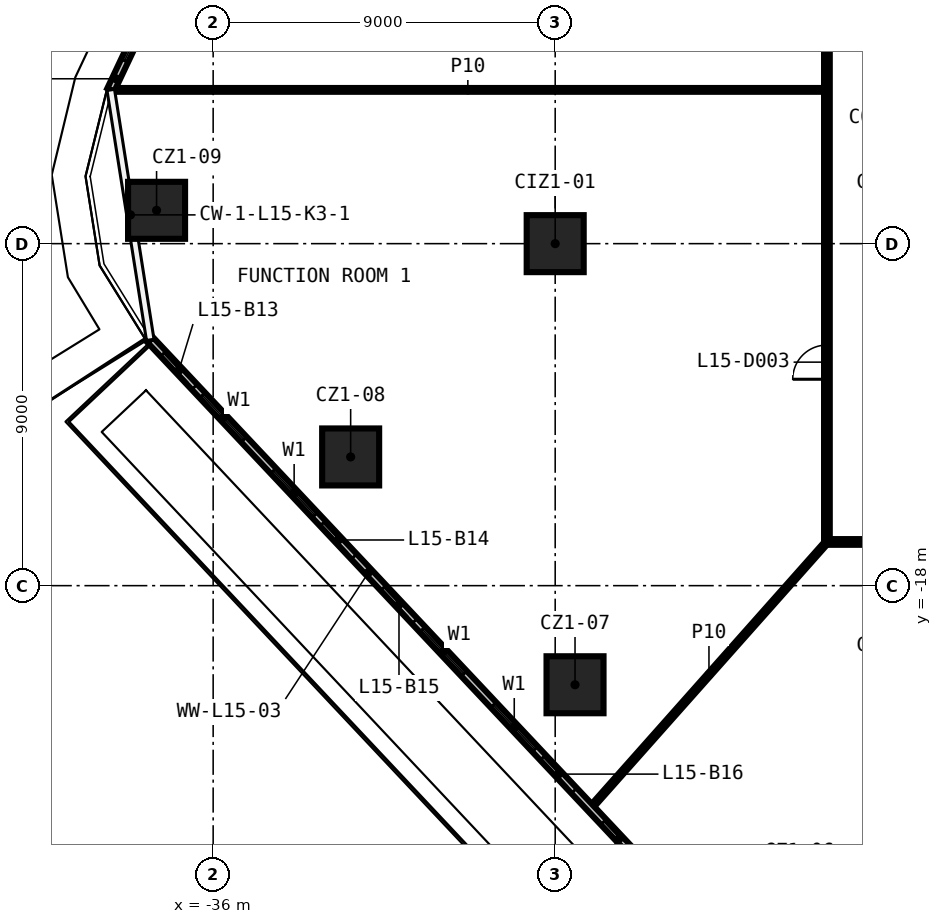
"""IFC4 building model, lengths in metres.
Left out: names, types, materials, properties, quantities, classifications, styles, units other than length and angle.
Written with IfcOpenShell. Run it as: python <this file> out.ifc"""

import sys

from ifc_helpers import new_model, si_unit, direction, frame, frame_2d, origin, origin_2d, place, context, subcontext, project, spatial, rectangle, extrude, element, fill, save


model = new_model("IFC4")
c1 = context("Model", 3, precision=1e-05, world=origin(), true_north=direction((0.0, 1.0)))
c2 = subcontext(c1, "Body", "Model", "MODEL_VIEW")
j1 = project(units=[si_unit("LENGTHUNIT", "METRE"), si_unit("PLANEANGLEUNIT", "RADIAN")], contexts=[c1])
p1 = place(None, origin())
s1 = spatial("IfcSite", under=j1, at=p1, CompositionType="ELEMENT")
p2 = place(p1, origin())
s2 = spatial("IfcBuilding", under=s1, at=p2, CompositionType="ELEMENT")
p3 = place(p2, frame((0.0, 0.0, 77.3)))
s3 = spatial("IfcBuildingStorey", under=s2, at=p3, CompositionType="ELEMENT", Elevation=77.3)
for number, where, z_axis, x_axis in (
    (1, (-26.478, -20.608, 0.0), (0.0, 0.0, 1.0), (1.0, 0.0, 0.0)),
    (2, (-32.382, -14.613, 0.0), (0.0, 0.0, 1.0), (1.0, 0.0, 0.0)),
    (3, (-37.489, -8.123, 0.0), (0.0, 0.0, 1.0), (1.0, 0.0, 0.0)),
    (4, (-27.0, -9.0, 0.0), (0.0, 0.0, 1.0), (1.0, 0.0, 0.0)),
):
    element("IfcColumn", number, at=place(p3, frame(where, z_axis=z_axis, x_axis=x_axis)), inside=s3, PredefinedType="COLUMN", context=c2, shape_type="SweptSolid", body=[
        extrude(rectangle(XDim=1.5, YDim=1.5, at=origin_2d()), origin(), (0.0, 0.0, 1.0), 3.3),
    ])
p4 = place(p3, frame((19.925, -16.85, 0.0), z_axis=(0.0, 0.0, 1.0), x_axis=(-1.0, 0.0, 0.0)))
e5 = element("IfcWall", 5, at=p4, inside=s3, PredefinedType="PARTITIONING", context=c2, shape_type="SweptSolid", body=[
    extrude(rectangle(XDim=39.85, YDim=0.15, at=frame_2d((19.925, 0.0))), origin(), (0.0, 0.0, 1.0), 3.3),
])
p5 = place(p4, frame((35.06, 0.0, 0.0)))
e6 = element("IfcOpeningElement", 6, at=p5, cuts=e5, PredefinedType="OPENING", context=c2, shape_type="SweptSolid", body=[
    extrude(rectangle(XDim=0.9, YDim=2.1, at=frame_2d((0.45, 1.05))), frame((0.0, 0.085, 0.0), z_axis=(0.0, -1.0, 0.0), x_axis=(1.0, 0.0, 0.0)), (0.0, 0.0, 1.0), 0.17),
])
p6 = place(p4, frame((30.967, 0.0, 0.0)))
e7 = element("IfcOpeningElement", 7, at=p6, cuts=e5, PredefinedType="OPENING", context=c2, shape_type="SweptSolid", body=[
    extrude(rectangle(XDim=1.0, YDim=2.1, at=frame_2d((0.5, 1.05))), frame((0.0, 0.085, 0.0), z_axis=(0.0, -1.0, 0.0), x_axis=(1.0, 0.0, 0.0)), (0.0, 0.0, 1.0), 0.17),
])
p7 = place(p4, frame((21.934, 0.0, 0.0)))
e8 = element("IfcOpeningElement", 8, at=p7, cuts=e5, PredefinedType="OPENING", context=c2, shape_type="SweptSolid", body=[
    extrude(rectangle(XDim=0.9, YDim=2.1, at=frame_2d((0.45, 1.05))), frame((0.0, 0.085, 0.0), z_axis=(0.0, -1.0, 0.0), x_axis=(1.0, 0.0, 0.0)), (0.0, 0.0, 1.0), 0.17),
])
p8 = place(p4, frame((3.879, 0.0, 0.0)))
e9 = element("IfcOpeningElement", 9, at=p8, cuts=e5, PredefinedType="OPENING", context=c2, shape_type="SweptSolid", body=[
    extrude(rectangle(XDim=0.9, YDim=2.1, at=frame_2d((0.45, 1.05))), frame((0.0, 0.085, 0.0), z_axis=(0.0, -1.0, 0.0), x_axis=(1.0, 0.0, 0.0)), (0.0, 0.0, 1.0), 0.17),
])
p9 = place(p3, frame((-38.672, -4.954, 0.0), z_axis=(0.0, 0.0, 1.0), x_axis=(1.0, 0.0, 0.0)))
e10 = element("IfcWall", 10, at=p9, inside=s3, PredefinedType="PARTITIONING", context=c2, shape_type="SweptSolid", body=[
    extrude(rectangle(XDim=18.747, YDim=0.1, at=frame_2d((9.374, 0.0))), origin(), (0.0, 0.0, 1.0), 3.3),
])
p10 = place(p3, frame((-26.058, -23.84, 0.0), z_axis=(0.0, 0.0, 1.0), x_axis=(0.664057412605, 0.747681585145, 0.0)))
e11 = element("IfcWall", 11, at=p10, inside=s3, PredefinedType="PARTITIONING", context=c2, shape_type="SweptSolid", body=[
    extrude(rectangle(XDim=9.348, YDim=0.1, at=frame_2d((4.674, 0.0))), origin(), (0.0, 0.0, 1.0), 3.3),
])
p11 = place(p3, frame((-19.85, -16.775, 0.0), z_axis=(0.0, 0.0, 1.0), x_axis=(0.0, 1.0, 0.0)))
e12 = element("IfcWall", 12, at=p11, inside=s3, PredefinedType="PARTITIONING", context=c2, shape_type="SweptSolid", body=[
    extrude(rectangle(XDim=33.55, YDim=0.15, at=frame_2d((16.775, 0.0))), origin(), (0.0, 0.0, 1.0), 3.3),
])
p12 = place(p11, frame((13.332, 0.0, 0.0)))
e13 = element("IfcOpeningElement", 13, at=p12, cuts=e12, PredefinedType="OPENING", context=c2, shape_type="SweptSolid", body=[
    extrude(rectangle(XDim=1.0, YDim=2.1, at=frame_2d((0.5, 1.05))), frame((0.0, 0.085, 0.0), z_axis=(0.0, -1.0, 0.0), x_axis=(1.0, 0.0, 0.0)), (0.0, 0.0, 1.0), 0.17),
])
p13 = place(p11, frame((4.207, 0.0, 0.0)))
e14 = element("IfcOpeningElement", 14, at=p13, cuts=e12, PredefinedType="OPENING", context=c2, shape_type="SweptSolid", body=[
    extrude(rectangle(XDim=0.9, YDim=2.1, at=frame_2d((0.45, 1.05))), frame((0.0, 0.085, 0.0), z_axis=(0.0, -1.0, 0.0), x_axis=(1.0, 0.0, 0.0)), (0.0, 0.0, 1.0), 0.17),
])
p14 = place(p11, frame((21.389, 0.0, 0.0)))
e15 = element("IfcOpeningElement", 15, at=p14, cuts=e12, PredefinedType="OPENING", context=c2, shape_type="SweptSolid", body=[
    extrude(rectangle(XDim=1.0, YDim=2.1, at=frame_2d((0.5, 1.05))), frame((0.0, 0.085, 0.0), z_axis=(0.0, -1.0, 0.0), x_axis=(1.0, 0.0, 0.0)), (0.0, 0.0, 1.0), 0.17),
])
p15 = place(p3, frame((-36.794, -0.933, 0.0), z_axis=(0.0, 0.0, 1.0), x_axis=(-0.427189555154, -0.904162089433, 0.0)))
e16 = element("IfcWall", 16, at=p15, inside=s3, PredefinedType="SOLIDWALL", context=c2, shape_type="SweptSolid", body=[
    extrude(rectangle(XDim=4.448, YDim=0.2, at=frame_2d((2.224, 0.0))), origin(), (0.0, 0.0, 1.0), 3.3),
])
p16 = place(p15, frame((2.0, 0.0, 0.6)))
e17 = element("IfcOpeningElement", 17, at=p16, cuts=e16, PredefinedType="OPENING", context=c2, shape_type="SweptSolid", body=[
    extrude(rectangle(XDim=1.6, YDim=2.4, at=frame_2d((0.8, 1.2))), frame((0.0, 0.11, 0.0), z_axis=(0.0, -1.0, 0.0), x_axis=(1.0, 0.0, 0.0)), (0.0, 0.0, 1.0), 0.22),
])
p17 = place(p15, frame((0.5, 0.0, 0.0)))
e18 = element("IfcOpeningElement", 18, at=p17, cuts=e16, PredefinedType="OPENING", context=c2, shape_type="SweptSolid", body=[
    extrude(rectangle(XDim=1.2, YDim=2.4, at=frame_2d((0.6, 1.2))), frame((0.0, 0.11, 0.0), z_axis=(0.0, -1.0, 0.0), x_axis=(1.0, 0.0, 0.0)), (0.0, 0.0, 1.0), 0.22),
])
p18 = place(p3, frame((-37.656, -11.532, 0.0), z_axis=(0.0, 0.0, 1.0), x_axis=(0.684960405986, -0.728580292234, 0.0)))
e19 = element("IfcWall", 19, at=p18, inside=s3, PredefinedType="SOLIDWALL", context=c2, shape_type="SweptSolid", body=[
    extrude(rectangle(XDim=21.14, YDim=0.2, at=frame_2d((10.57, 0.0))), origin(), (0.0, 0.0, 1.0), 3.3),
])
p19 = place(p18, frame((2.0, 0.0, 0.6)))
e20 = element("IfcOpeningElement", 20, at=p19, cuts=e19, PredefinedType="OPENING", context=c2, shape_type="SweptSolid", body=[
    extrude(rectangle(XDim=1.6, YDim=2.4, at=frame_2d((0.8, 1.2))), frame((0.0, 0.11, 0.0), z_axis=(0.0, -1.0, 0.0), x_axis=(1.0, 0.0, 0.0)), (0.0, 0.0, 1.0), 0.22),
])
p20 = place(p18, frame((0.5, 0.0, 0.0)))
e21 = element("IfcOpeningElement", 21, at=p20, cuts=e19, PredefinedType="OPENING", context=c2, shape_type="SweptSolid", body=[
    extrude(rectangle(XDim=1.2, YDim=2.4, at=frame_2d((0.6, 1.2))), frame((0.0, 0.11, 0.0), z_axis=(0.0, -1.0, 0.0), x_axis=(1.0, 0.0, 0.0)), (0.0, 0.0, 1.0), 0.22),
])
p21 = place(p18, frame((4.728, 0.0, 0.6)))
e22 = element("IfcOpeningElement", 22, at=p21, cuts=e19, PredefinedType="OPENING", context=c2, shape_type="SweptSolid", body=[
    extrude(rectangle(XDim=1.6, YDim=2.4, at=frame_2d((0.8, 1.2))), frame((0.0, 0.11, 0.0), z_axis=(0.0, -1.0, 0.0), x_axis=(1.0, 0.0, 0.0)), (0.0, 0.0, 1.0), 0.22),
])
p22 = place(p18, frame((6.628, 0.0, 0.0)))
e23 = element("IfcOpeningElement", 23, at=p22, cuts=e19, PredefinedType="OPENING", context=c2, shape_type="SweptSolid", body=[
    extrude(rectangle(XDim=1.2, YDim=2.4, at=frame_2d((0.6, 1.2))), frame((0.0, 0.11, 0.0), z_axis=(0.0, -1.0, 0.0), x_axis=(1.0, 0.0, 0.0)), (0.0, 0.0, 1.0), 0.22),
])
p23 = place(p18, frame((10.456, 0.0, 0.6)))
e24 = element("IfcOpeningElement", 24, at=p23, cuts=e19, PredefinedType="OPENING", context=c2, shape_type="SweptSolid", body=[
    extrude(rectangle(XDim=1.6, YDim=2.4, at=frame_2d((0.8, 1.2))), frame((0.0, 0.11, 0.0), z_axis=(0.0, -1.0, 0.0), x_axis=(1.0, 0.0, 0.0)), (0.0, 0.0, 1.0), 0.22),
])
p24 = place(p18, frame((8.956, 0.0, 0.0)))
e25 = element("IfcOpeningElement", 25, at=p24, cuts=e19, PredefinedType="OPENING", context=c2, shape_type="SweptSolid", body=[
    extrude(rectangle(XDim=1.2, YDim=2.4, at=frame_2d((0.6, 1.2))), frame((0.0, 0.11, 0.0), z_axis=(0.0, -1.0, 0.0), x_axis=(1.0, 0.0, 0.0)), (0.0, 0.0, 1.0), 0.22),
])
p25 = place(p18, frame((13.184, 0.0, 0.6)))
e26 = element("IfcOpeningElement", 26, at=p25, cuts=e19, PredefinedType="OPENING", context=c2, shape_type="SweptSolid", body=[
    extrude(rectangle(XDim=1.6, YDim=2.4, at=frame_2d((0.8, 1.2))), frame((0.0, 0.11, 0.0), z_axis=(0.0, -1.0, 0.0), x_axis=(1.0, 0.0, 0.0)), (0.0, 0.0, 1.0), 0.22),
])
p26 = place(p18, frame((15.084, 0.0, 0.0)))
e27 = element("IfcOpeningElement", 27, at=p26, cuts=e19, PredefinedType="OPENING", context=c2, shape_type="SweptSolid", body=[
    extrude(rectangle(XDim=1.2, YDim=2.4, at=frame_2d((0.6, 1.2))), frame((0.0, 0.11, 0.0), z_axis=(0.0, -1.0, 0.0), x_axis=(1.0, 0.0, 0.0)), (0.0, 0.0, 1.0), 0.22),
])
p27 = place(p18, frame((18.912, 0.0, 0.6)))
e28 = element("IfcOpeningElement", 28, at=p27, cuts=e19, PredefinedType="OPENING", context=c2, shape_type="SweptSolid", body=[
    extrude(rectangle(XDim=1.6, YDim=2.4, at=frame_2d((0.8, 1.2))), frame((0.0, 0.11, 0.0), z_axis=(0.0, -1.0, 0.0), x_axis=(1.0, 0.0, 0.0)), (0.0, 0.0, 1.0), 0.22),
])
p28 = place(p18, frame((17.412, 0.0, 0.0)))
e29 = element("IfcOpeningElement", 29, at=p28, cuts=e19, PredefinedType="OPENING", context=c2, shape_type="SweptSolid", body=[
    extrude(rectangle(XDim=1.2, YDim=2.4, at=frame_2d((0.6, 1.2))), frame((0.0, 0.11, 0.0), z_axis=(0.0, -1.0, 0.0), x_axis=(1.0, 0.0, 0.0)), (0.0, 0.0, 1.0), 0.22),
])
p29 = place(p13, origin())
e30 = element("IfcDoor", 30, at=p29, inside=s3, OperationType="SINGLE_SWING_LEFT", PredefinedType="DOOR", context=c2, shape_type="SweptSolid", body=[
    extrude(rectangle(XDim=0.9, YDim=2.1, at=frame_2d((0.45, 1.05))), frame((0.0, 0.025, 0.0), z_axis=(0.0, -1.0, 0.0), x_axis=(1.0, 0.0, 0.0)), (0.0, 0.0, 1.0), 0.05),
])
fill(e14, e30)
p30 = place(p16, origin())
e31 = element("IfcWindow", 31, at=p30, inside=s3, PartitioningType="SINGLE_PANEL", PredefinedType="WINDOW", context=c2, shape_type="SweptSolid", body=[
    extrude(rectangle(XDim=1.6, YDim=2.4, at=frame_2d((0.8, 1.2))), frame((0.0, 0.03, 0.0), z_axis=(0.0, -1.0, 0.0), x_axis=(1.0, 0.0, 0.0)), (0.0, 0.0, 1.0), 0.06),
])
fill(e17, e31)
p31 = place(p19, origin())
e32 = element("IfcWindow", 32, at=p31, inside=s3, PartitioningType="SINGLE_PANEL", PredefinedType="WINDOW", context=c2, shape_type="SweptSolid", body=[
    extrude(rectangle(XDim=1.6, YDim=2.4, at=frame_2d((0.8, 1.2))), frame((0.0, 0.03, 0.0), z_axis=(0.0, -1.0, 0.0), x_axis=(1.0, 0.0, 0.0)), (0.0, 0.0, 1.0), 0.06),
])
fill(e20, e32)
p32 = place(p20, origin())
e33 = element("IfcDoor", 33, at=p32, inside=s3, OperationType="SLIDING_TO_LEFT", PredefinedType="DOOR", context=c2, shape_type="SweptSolid", body=[
    extrude(rectangle(XDim=1.2, YDim=2.4, at=frame_2d((0.6, 1.2))), frame((0.0, 0.025, 0.0), z_axis=(0.0, -1.0, 0.0), x_axis=(1.0, 0.0, 0.0)), (0.0, 0.0, 1.0), 0.05),
])
fill(e21, e33)
p33 = place(p21, origin())
e34 = element("IfcWindow", 34, at=p33, inside=s3, PartitioningType="SINGLE_PANEL", PredefinedType="WINDOW", context=c2, shape_type="SweptSolid", body=[
    extrude(rectangle(XDim=1.6, YDim=2.4, at=frame_2d((0.8, 1.2))), frame((0.0, 0.03, 0.0), z_axis=(0.0, -1.0, 0.0), x_axis=(1.0, 0.0, 0.0)), (0.0, 0.0, 1.0), 0.06),
])
fill(e22, e34)
p34 = place(p22, origin())
e35 = element("IfcDoor", 35, at=p34, inside=s3, OperationType="SLIDING_TO_LEFT", PredefinedType="DOOR", context=c2, shape_type="SweptSolid", body=[
    extrude(rectangle(XDim=1.2, YDim=2.4, at=frame_2d((0.6, 1.2))), frame((0.0, 0.025, 0.0), z_axis=(0.0, -1.0, 0.0), x_axis=(1.0, 0.0, 0.0)), (0.0, 0.0, 1.0), 0.05),
])
fill(e23, e35)
p35 = place(p23, origin())
e36 = element("IfcWindow", 36, at=p35, inside=s3, PartitioningType="SINGLE_PANEL", PredefinedType="WINDOW", context=c2, shape_type="SweptSolid", body=[
    extrude(rectangle(XDim=1.6, YDim=2.4, at=frame_2d((0.8, 1.2))), frame((0.0, 0.03, 0.0), z_axis=(0.0, -1.0, 0.0), x_axis=(1.0, 0.0, 0.0)), (0.0, 0.0, 1.0), 0.06),
])
fill(e24, e36)
p36 = place(p24, origin())
e37 = element("IfcDoor", 37, at=p36, inside=s3, OperationType="SLIDING_TO_LEFT", PredefinedType="DOOR", context=c2, shape_type="SweptSolid", body=[
    extrude(rectangle(XDim=1.2, YDim=2.4, at=frame_2d((0.6, 1.2))), frame((0.0, 0.025, 0.0), z_axis=(0.0, -1.0, 0.0), x_axis=(1.0, 0.0, 0.0)), (0.0, 0.0, 1.0), 0.05),
])
fill(e25, e37)
p37 = place(p25, origin())
e38 = element("IfcWindow", 38, at=p37, inside=s3, PartitioningType="SINGLE_PANEL", PredefinedType="WINDOW", context=c2, shape_type="SweptSolid", body=[
    extrude(rectangle(XDim=1.6, YDim=2.4, at=frame_2d((0.8, 1.2))), frame((0.0, 0.03, 0.0), z_axis=(0.0, -1.0, 0.0), x_axis=(1.0, 0.0, 0.0)), (0.0, 0.0, 1.0), 0.06),
])
fill(e26, e38)
p38 = place(p26, origin())
e39 = element("IfcDoor", 39, at=p38, inside=s3, OperationType="SLIDING_TO_LEFT", PredefinedType="DOOR", context=c2, shape_type="SweptSolid", body=[
    extrude(rectangle(XDim=1.2, YDim=2.4, at=frame_2d((0.6, 1.2))), frame((0.0, 0.025, 0.0), z_axis=(0.0, -1.0, 0.0), x_axis=(1.0, 0.0, 0.0)), (0.0, 0.0, 1.0), 0.05),
])
fill(e27, e39)
p39 = place(p28, origin())
e40 = element("IfcDoor", 40, at=p39, inside=s3, OperationType="SLIDING_TO_LEFT", PredefinedType="DOOR", context=c2, shape_type="SweptSolid", body=[
    extrude(rectangle(XDim=1.2, YDim=2.4, at=frame_2d((0.6, 1.2))), frame((0.0, 0.025, 0.0), z_axis=(0.0, -1.0, 0.0), x_axis=(1.0, 0.0, 0.0)), (0.0, 0.0, 1.0), 0.05),
])
fill(e29, e40)
save(model, sys.argv[1])
